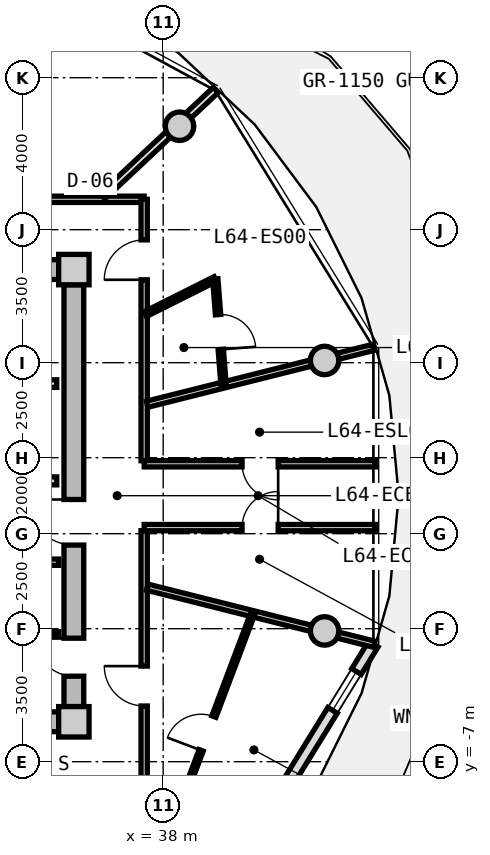
"""IFC4 building model, lengths in metres.
Left out: names, types, materials, properties, quantities, classifications, styles, units other than length and angle.
Written with IfcOpenShell. Run it as: python <this file> out.ifc"""

import sys

from ifc_helpers import new_model, si_unit, direction, frame, frame_2d, origin, origin_2d, place, context, subcontext, project, spatial, rectangle, circle, extrude, source, transform, mapped, element, fill, save


model = new_model("IFC4")
c1 = context("Model", 3, precision=1e-05, world=origin(), true_north=direction((0.0, 1.0)))
c2 = subcontext(c1, "Body", "Model", "MODEL_VIEW")
j1 = project(units=[si_unit("LENGTHUNIT", "METRE"), si_unit("PLANEANGLEUNIT", "RADIAN")], contexts=[c1])
p1 = place(None, origin())
s1 = spatial("IfcSite", under=j1, at=p1, CompositionType="ELEMENT")
p2 = place(p1, origin())
s2 = spatial("IfcBuilding", under=s1, at=p2, CompositionType="ELEMENT")
p3 = place(p2, frame((0.0, 0.0, 207.8)))
s3 = spatial("IfcBuildingStorey", under=s2, at=p3, CompositionType="ELEMENT", Elevation=207.8)
m1 = source(origin(), c2, "Body", "SweptSolid", [
    extrude(rectangle(XDim=0.8, YDim=0.8, at=origin_2d()), origin(), (0.0, 0.0, 1.0), 3.05),
])
for number, where, z_axis, x_axis in (
    (1, (35.65, -5.95, 0.0), (0.0, 0.0, 1.0), (1.0, 0.0, 0.0)),
    (2, (35.65, 5.95, 0.0), (0.0, 0.0, 1.0), (1.0, 0.0, 0.0)),
):
    element("IfcColumn", number, at=place(p3, frame(where, z_axis=z_axis, x_axis=x_axis)), inside=s3, PredefinedType="COLUMN", context=c2, shape_type="MappedRepresentation", body=[
        mapped(m1, transform((0.0, 0.0, 0.0), x_axis=(1.0, 0.0, 0.0), y_axis=(0.0, 1.0, 0.0), z_axis=(0.0, 0.0, 1.0), scale=1.0)),
    ])
m2 = source(origin(), c2, "Body", "SweptSolid", [
    extrude(rectangle(XDim=14.5, YDim=0.52, at=frame_2d((7.25, 0.0))), origin(), (0.0, 0.0, 1.0), 2.76),
])
for number, where, z_axis, x_axis in (
    (3, (20.75, 5.95, 0.0), (0.0, 0.0, 1.0), (1.0, 0.0, 0.0)),
    (4, (35.25, -5.95, 0.0), (0.0, 0.0, 1.0), (-1.0, 0.0, 0.0)),
):
    element("IfcWall", number, at=place(p3, frame(where, z_axis=z_axis, x_axis=x_axis)), inside=s3, PredefinedType="SHEAR", context=c2, shape_type="MappedRepresentation", body=[
        mapped(m2, transform((0.0, 0.0, 0.0), x_axis=(1.0, 0.0, 0.0), y_axis=(0.0, 1.0, 0.0), z_axis=(0.0, 0.0, 1.0), scale=1.0)),
    ])
m3 = source(origin(), c2, "Body", "SweptSolid", [
    extrude(rectangle(XDim=11.1, YDim=0.52, at=frame_2d((5.55, 0.0))), origin(), (0.0, 0.0, 1.0), 2.76),
])
p4 = place(p3, frame((35.65, 5.55, 0.0), z_axis=(0.0, 0.0, 1.0), x_axis=(0.0, -1.0, 0.0)))
e5 = element("IfcWall", 5, at=p4, inside=s3, PredefinedType="SHEAR", context=c2, shape_type="MappedRepresentation", body=[
    mapped(m3, transform((0.0, 0.0, 0.0), x_axis=(1.0, 0.0, 0.0), y_axis=(0.0, 1.0, 0.0), z_axis=(0.0, 0.0, 1.0), scale=1.0)),
])
p5 = place(p4, frame((5.65, 0.0, 0.0)))
e6 = element("IfcOpeningElement", 6, at=p5, cuts=e5, PredefinedType="OPENING", context=c2, shape_type="SweptSolid", body=[
    extrude(rectangle(XDim=1.2, YDim=2.15, at=frame_2d((0.6, 1.075))), frame((0.0, 0.27, 0.0), z_axis=(0.0, -1.0, 0.0), x_axis=(1.0, 0.0, 0.0)), (0.0, 0.0, 1.0), 0.54),
])
p6 = place(p4, frame((9.3, 0.0, 0.0)))
e7 = element("IfcOpeningElement", 7, at=p6, cuts=e5, PredefinedType="OPENING", context=c2, shape_type="SweptSolid", body=[
    extrude(rectangle(XDim=1.0, YDim=2.1, at=frame_2d((0.5, 1.05))), frame((0.0, 0.27, 0.0), z_axis=(0.0, -1.0, 0.0), x_axis=(1.0, 0.0, 0.0)), (0.0, 0.0, 1.0), 0.54),
])
m4 = source(origin(), c2, "Body", "SweptSolid", [
    extrude(circle(Radius=0.375, at=origin_2d()), origin(), (0.0, 0.0, 1.0), 3.05),
])
for number, where, z_axis, x_axis in (
    (8, (42.247, 3.559, 0.0), (0.0, 0.0, 1.0), (1.0, 0.0, 0.0)),
    (9, (38.43, 9.723, 0.0), (0.0, 0.0, 1.0), (1.0, 0.0, 0.0)),
    (10, (42.247, -3.559, 0.0), (0.0, 0.0, 1.0), (1.0, 0.0, 0.0)),
):
    element("IfcColumn", number, at=place(p3, frame(where, z_axis=z_axis, x_axis=x_axis)), inside=s3, PredefinedType="COLUMN", context=c2, shape_type="MappedRepresentation", body=[
        mapped(m4, transform((0.0, 0.0, 0.0), x_axis=(1.0, 0.0, 0.0), y_axis=(0.0, 1.0, 0.0), z_axis=(0.0, 0.0, 1.0), scale=1.0)),
    ])
m5 = source(origin(), c2, "Body", "SweptSolid", [
    extrude(rectangle(XDim=7.938, YDim=0.29, at=frame_2d((3.969, 0.0))), origin(), (0.0, 0.0, 1.0), 2.76),
])
p7 = place(p3, frame((43.532, -3.903, 0.0), z_axis=(0.0, 0.0, 1.0), x_axis=(-0.524244987663, -0.851567491694, 0.0)))
e11 = element("IfcWall", 11, at=p7, inside=s3, PredefinedType="SOLIDWALL", context=c2, shape_type="MappedRepresentation", body=[
    mapped(m5, transform((0.0, 0.0, 0.0), x_axis=(1.0, 0.0, 0.0), y_axis=(0.0, 1.0, 0.0), z_axis=(0.0, 0.0, 1.0), scale=1.0)),
])
p8 = place(p7, frame((5.94, 0.0, 0.0)))
e12 = element("IfcOpeningElement", 12, at=p8, cuts=e11, PredefinedType="OPENING", context=c2, shape_type="SweptSolid", body=[
    extrude(rectangle(XDim=1.15, YDim=2.25, at=frame_2d((0.575, 1.125))), frame((0.0, 0.155, 0.0), z_axis=(0.0, -1.0, 0.0), x_axis=(1.0, 0.0, 0.0)), (0.0, 0.0, 1.0), 0.31),
])
p9 = place(p7, frame((0.85, 0.0, 0.85)))
e13 = element("IfcOpeningElement", 13, at=p9, cuts=e11, PredefinedType="OPENING", context=c2, shape_type="SweptSolid", body=[
    extrude(rectangle(XDim=1.2, YDim=1.5, at=frame_2d((0.6, 0.75))), frame((0.0, 0.155, 0.0), z_axis=(0.0, -1.0, 0.0), x_axis=(1.0, 0.0, 0.0)), (0.0, 0.0, 1.0), 0.31),
])
m6 = source(origin(), c2, "Body", "SweptSolid", [
    extrude(rectangle(XDim=3.2, YDim=0.2, at=frame_2d((1.6, 0.0))), origin(), (0.0, 0.0, 1.0), 2.745),
])
p10 = place(p3, frame((32.0, 2.95, 0.0), z_axis=(0.0, 0.0, 1.0), x_axis=(1.0, 0.0, 0.0)))
e14 = element("IfcWall", 14, at=p10, inside=s3, PredefinedType="PARTITIONING", context=c2, shape_type="MappedRepresentation", body=[
    mapped(m6, transform((0.0, 0.0, 0.0), x_axis=(1.0, 0.0, 0.0), y_axis=(0.0, 1.0, 0.0), z_axis=(0.0, 0.0, 1.0), scale=1.0)),
])
m7 = source(origin(), c2, "Body", "SweptSolid", [
    extrude(rectangle(XDim=6.66, YDim=0.21, at=frame_2d((3.33, 0.0))), origin(), (0.0, 0.0, 1.0), 2.745),
])
p11 = place(p3, frame((28.54, 0.39, 0.0), z_axis=(0.0, 0.0, 1.0), x_axis=(1.0, 0.0, 0.0)))
e15 = element("IfcWall", 15, at=p11, inside=s3, PredefinedType="PARTITIONING", context=c2, shape_type="MappedRepresentation", body=[
    mapped(m7, transform((0.0, 0.0, 0.0), x_axis=(1.0, 0.0, 0.0), y_axis=(0.0, 1.0, 0.0), z_axis=(0.0, 0.0, 1.0), scale=1.0)),
])
p12 = place(p11, frame((1.0, 0.0, 0.0)))
e16 = element("IfcOpeningElement", 16, at=p12, cuts=e15, PredefinedType="OPENING", context=c2, shape_type="SweptSolid", body=[
    extrude(rectangle(XDim=1.2, YDim=2.15, at=frame_2d((0.6, 1.075))), frame((0.0, 0.115, 0.0), z_axis=(0.0, -1.0, 0.0), x_axis=(1.0, 0.0, 0.0)), (0.0, 0.0, 1.0), 0.23),
])
m8 = source(origin(), c2, "Body", "SweptSolid", [
    extrude(rectangle(XDim=2.7, YDim=0.165, at=frame_2d((1.35, 0.0))), origin(), (0.0, 0.0, 1.0), 2.745),
])
p13 = place(p3, frame((32.55, -1.75, 0.0), z_axis=(0.0, 0.0, 1.0), x_axis=(1.0, 0.0, 0.0)))
e17 = element("IfcWall", 17, at=p13, inside=s3, PredefinedType="PARTITIONING", context=c2, shape_type="MappedRepresentation", body=[
    mapped(m8, transform((0.0, 0.0, 0.0), x_axis=(1.0, 0.0, 0.0), y_axis=(0.0, 1.0, 0.0), z_axis=(0.0, 0.0, 1.0), scale=1.0)),
])
p14 = place(p13, frame((0.85, 0.0, 0.0)))
e18 = element("IfcOpeningElement", 18, at=p14, cuts=e17, PredefinedType="OPENING", context=c2, shape_type="SweptSolid", body=[
    extrude(rectangle(XDim=0.925, YDim=2.1, at=frame_2d((0.462, 1.05))), frame((0.0, 0.093, 0.0), z_axis=(0.0, -1.0, 0.0), x_axis=(1.0, 0.0, 0.0)), (0.0, 0.0, 1.0), 0.185),
])
m9 = source(origin(), c2, "Body", "SweptSolid", [
    extrude(rectangle(XDim=2.7, YDim=0.14, at=frame_2d((1.35, 0.0))), origin(), (0.0, 0.0, 1.0), 2.745),
])
p15 = place(p3, frame((32.55, -3.65, 0.0), z_axis=(0.0, 0.0, 1.0), x_axis=(1.0, 0.0, 0.0)))
e19 = element("IfcWall", 19, at=p15, inside=s3, PredefinedType="PARTITIONING", context=c2, shape_type="MappedRepresentation", body=[
    mapped(m9, transform((0.0, 0.0, 0.0), x_axis=(1.0, 0.0, 0.0), y_axis=(0.0, 1.0, 0.0), z_axis=(0.0, 0.0, 1.0), scale=1.0)),
])
m10 = source(origin(), c2, "Body", "SweptSolid", [
    extrude(rectangle(XDim=8.58, YDim=0.165, at=frame_2d((4.29, 0.0))), origin(), (0.0, 0.0, 1.0), 2.745),
])
p16 = place(p3, frame((28.92, 7.8, 0.0), z_axis=(0.0, 0.0, 1.0), x_axis=(1.0, 0.0, 0.0)))
e20 = element("IfcWall", 20, at=p16, inside=s3, PredefinedType="PARTITIONING", context=c2, shape_type="MappedRepresentation", body=[
    mapped(m10, transform((0.0, 0.0, 0.0), x_axis=(1.0, 0.0, 0.0), y_axis=(0.0, 1.0, 0.0), z_axis=(0.0, 0.0, 1.0), scale=1.0)),
])
p17 = place(p16, frame((3.802, 0.0, 0.0)))
e21 = element("IfcOpeningElement", 21, at=p17, cuts=e20, PredefinedType="OPENING", context=c2, shape_type="SweptSolid", body=[
    extrude(rectangle(XDim=1.25, YDim=2.2, at=frame_2d((0.625, 1.1))), frame((0.0, 0.093, 0.0), z_axis=(0.0, -1.0, 0.0), x_axis=(1.0, 0.0, 0.0)), (0.0, 0.0, 1.0), 0.185),
])
m11 = source(origin(), c2, "Body", "SweptSolid", [
    extrude(rectangle(XDim=6.88, YDim=0.165, at=frame_2d((3.44, 0.0))), origin(), (0.0, 0.0, 1.0), 2.745),
])
p18 = place(p3, frame((37.5, 7.8, 0.0), z_axis=(0.0, 0.0, 1.0), x_axis=(0.0, -1.0, 0.0)))
e22 = element("IfcWall", 22, at=p18, inside=s3, PredefinedType="PARTITIONING", context=c2, shape_type="MappedRepresentation", body=[
    mapped(m11, transform((0.0, 0.0, 0.0), x_axis=(1.0, 0.0, 0.0), y_axis=(0.0, 1.0, 0.0), z_axis=(0.0, 0.0, 1.0), scale=1.0)),
])
p19 = place(p18, frame((1.068, 0.0, 0.0)))
e23 = element("IfcOpeningElement", 23, at=p19, cuts=e22, PredefinedType="OPENING", context=c2, shape_type="SweptSolid", body=[
    extrude(rectangle(XDim=1.05, YDim=2.15, at=frame_2d((0.525, 1.075))), frame((0.0, 0.093, 0.0), z_axis=(0.0, -1.0, 0.0), x_axis=(1.0, 0.0, 0.0)), (0.0, 0.0, 1.0), 0.185),
])
p20 = place(p3, frame((37.5, -0.92, 0.0), z_axis=(0.0, 0.0, 1.0), x_axis=(0.0, -1.0, 0.0)))
e24 = element("IfcWall", 24, at=p20, inside=s3, PredefinedType="PARTITIONING", context=c2, shape_type="MappedRepresentation", body=[
    mapped(m11, transform((0.0, 0.0, 0.0), x_axis=(1.0, 0.0, 0.0), y_axis=(0.0, 1.0, 0.0), z_axis=(0.0, 0.0, 1.0), scale=1.0)),
])
p21 = place(p20, frame((3.564, 0.0, 0.0)))
e25 = element("IfcOpeningElement", 25, at=p21, cuts=e24, PredefinedType="OPENING", context=c2, shape_type="SweptSolid", body=[
    extrude(rectangle(XDim=1.05, YDim=2.15, at=frame_2d((0.525, 1.075))), frame((0.0, 0.093, 0.0), z_axis=(0.0, -1.0, 0.0), x_axis=(1.0, 0.0, 0.0)), (0.0, 0.0, 1.0), 0.185),
])
m12 = source(origin(), c2, "Body", "SweptSolid", [
    extrude(rectangle(XDim=6.157, YDim=0.165, at=frame_2d((3.079, 0.0))), origin(), (0.0, 0.0, 1.0), 2.385),
])
p22 = place(p3, frame((37.58, -2.407, 0.0), z_axis=(0.0, 0.0, 1.0), x_axis=(0.969840867184, -0.243738984038, 0.0)))
e26 = element("IfcWall", 26, at=p22, inside=s3, PredefinedType="PARTITIONING", context=c2, shape_type="MappedRepresentation", body=[
    mapped(m12, transform((0.0, 0.0, 0.0), x_axis=(1.0, 0.0, 0.0), y_axis=(0.0, 1.0, 0.0), z_axis=(0.0, 0.0, 1.0), scale=1.0)),
])
m13 = source(origin(), c2, "Body", "SweptSolid", [
    extrude(rectangle(XDim=6.157, YDim=0.165, at=frame_2d((3.079, 0.0))), origin(), (0.0, 0.0, 1.0), 2.345),
])
p23 = place(p3, frame((37.58, 2.407, 0.0), z_axis=(0.0, 0.0, 1.0), x_axis=(0.969840867184, 0.243738984038, 0.0)))
e27 = element("IfcWall", 27, at=p23, inside=s3, PredefinedType="PARTITIONING", context=c2, shape_type="MappedRepresentation", body=[
    mapped(m13, transform((0.0, 0.0, 0.0), x_axis=(1.0, 0.0, 0.0), y_axis=(0.0, 1.0, 0.0), z_axis=(0.0, 0.0, 1.0), scale=1.0)),
])
m14 = source(origin(), c2, "Body", "SweptSolid", [
    extrude(rectangle(XDim=6.101, YDim=0.165, at=frame_2d((3.051, 0.0))), origin(), (0.0, 0.0, 1.0), 2.745),
])
p24 = place(p3, frame((37.5, 0.84, 0.0), z_axis=(0.0, 0.0, 1.0), x_axis=(1.0, 0.0, 0.0)))
e28 = element("IfcWall", 28, at=p24, inside=s3, PredefinedType="PARTITIONING", context=c2, shape_type="MappedRepresentation", body=[
    mapped(m14, transform((0.0, 0.0, 0.0), x_axis=(1.0, 0.0, 0.0), y_axis=(0.0, 1.0, 0.0), z_axis=(0.0, 0.0, 1.0), scale=1.0)),
])
p25 = place(p24, frame((2.576, 0.0, 0.0)))
e29 = element("IfcOpeningElement", 29, at=p25, cuts=e28, PredefinedType="OPENING", context=c2, shape_type="SweptSolid", body=[
    extrude(rectangle(XDim=0.95, YDim=2.1, at=frame_2d((0.475, 1.05))), frame((0.0, 0.093, 0.0), z_axis=(0.0, -1.0, 0.0), x_axis=(1.0, 0.0, 0.0)), (0.0, 0.0, 1.0), 0.185),
])
p26 = place(p3, frame((43.601, -0.84, 0.0), z_axis=(0.0, 0.0, 1.0), x_axis=(-1.0, 0.0, 0.0)))
e30 = element("IfcWall", 30, at=p26, inside=s3, PredefinedType="PARTITIONING", context=c2, shape_type="MappedRepresentation", body=[
    mapped(m14, transform((0.0, 0.0, 0.0), x_axis=(1.0, 0.0, 0.0), y_axis=(0.0, 1.0, 0.0), z_axis=(0.0, 0.0, 1.0), scale=1.0)),
])
p27 = place(p26, frame((2.576, 0.0, 0.0)))
e31 = element("IfcOpeningElement", 31, at=p27, cuts=e30, PredefinedType="OPENING", context=c2, shape_type="SweptSolid", body=[
    extrude(rectangle(XDim=0.95, YDim=2.1, at=frame_2d((0.475, 1.05))), frame((0.0, 0.093, 0.0), z_axis=(0.0, -1.0, 0.0), x_axis=(1.0, 0.0, 0.0)), (0.0, 0.0, 1.0), 0.185),
])
m15 = source(origin(), c2, "Body", "SweptSolid", [
    extrude(rectangle(XDim=4.089, YDim=0.19, at=frame_2d((2.044, 0.0))), origin(), (0.0, 0.0, 1.0), 2.345),
])
p28 = place(p3, frame((36.402, 7.88, 0.0), z_axis=(0.0, 0.0, 1.0), x_axis=(0.729401273609, 0.684086092577, 0.0)))
e32 = element("IfcWall", 32, at=p28, inside=s3, PredefinedType="PARTITIONING", context=c2, shape_type="MappedRepresentation", body=[
    mapped(m15, transform((0.0, 0.0, 0.0), x_axis=(1.0, 0.0, 0.0), y_axis=(0.0, 1.0, 0.0), z_axis=(0.0, 0.0, 1.0), scale=1.0)),
])
m16 = source(origin(), c2, "Body", "SweptSolid", [
    extrude(rectangle(XDim=2.06, YDim=0.14, at=frame_2d((1.03, 0.0))), origin(), (0.0, 0.0, 1.0), 2.745),
])
p29 = place(p3, frame((37.53, 4.778, 0.0), z_axis=(0.0, 0.0, 1.0), x_axis=(0.893952568722, 0.448161583444, 0.0)))
e33 = element("IfcWall", 33, at=p29, inside=s3, PredefinedType="PARTITIONING", context=c2, shape_type="MappedRepresentation", body=[
    mapped(m16, transform((0.0, 0.0, 0.0), x_axis=(1.0, 0.0, 0.0), y_axis=(0.0, 1.0, 0.0), z_axis=(0.0, 0.0, 1.0), scale=1.0)),
])
m17 = source(origin(), c2, "Body", "SweptSolid", [
    extrude(rectangle(XDim=2.798, YDim=0.14, at=frame_2d((1.399, 0.0))), origin(), (0.0, 0.0, 1.0), 2.745),
])
p30 = place(p3, frame((39.371, 5.701, 0.0), z_axis=(0.0, 0.0, 1.0), x_axis=(0.077823984089, -0.996967114553, 0.0)))
e34 = element("IfcWall", 34, at=p30, inside=s3, PredefinedType="PARTITIONING", context=c2, shape_type="MappedRepresentation", body=[
    mapped(m17, transform((0.0, 0.0, 0.0), x_axis=(1.0, 0.0, 0.0), y_axis=(0.0, 1.0, 0.0), z_axis=(0.0, 0.0, 1.0), scale=1.0)),
])
p31 = place(p30, frame((0.939, 0.0, 0.0)))
e35 = element("IfcOpeningElement", 35, at=p31, cuts=e34, PredefinedType="OPENING", context=c2, shape_type="SweptSolid", body=[
    extrude(rectangle(XDim=0.92, YDim=2.1, at=frame_2d((0.46, 1.05))), frame((0.0, 0.08, 0.0), z_axis=(0.0, -1.0, 0.0), x_axis=(1.0, 0.0, 0.0)), (0.0, 0.0, 1.0), 0.16),
])
m18 = source(origin(), c2, "Body", "SweptSolid", [
    extrude(rectangle(XDim=6.738, YDim=0.115, at=frame_2d((3.369, 0.0))), origin(), (0.0, 0.0, 1.0), 2.745),
])
p32 = place(p3, frame((37.978, -9.409, 0.0), z_axis=(0.0, 0.0, 1.0), x_axis=(0.352945344347, 0.935643940772, 0.0)))
e36 = element("IfcWall", 36, at=p32, inside=s3, PredefinedType="PARTITIONING", context=c2, shape_type="MappedRepresentation", body=[
    mapped(m18, transform((0.0, 0.0, 0.0), x_axis=(1.0, 0.0, 0.0), y_axis=(0.0, 1.0, 0.0), z_axis=(0.0, 0.0, 1.0), scale=1.0)),
])
p33 = place(p32, frame((2.894, 0.0, 0.0)))
e37 = element("IfcOpeningElement", 37, at=p33, cuts=e36, PredefinedType="OPENING", context=c2, shape_type="SweptSolid", body=[
    extrude(rectangle(XDim=0.95, YDim=2.1, at=frame_2d((0.475, 1.05))), frame((0.0, 0.067, 0.0), z_axis=(0.0, -1.0, 0.0), x_axis=(1.0, 0.0, 0.0)), (0.0, 0.0, 1.0), 0.135),
])
m19 = source(origin(), c2, "Body", "SweptSolid", [
    extrude(rectangle(XDim=1.2, YDim=1.5, at=frame_2d((0.6, 0.75))), frame((0.0, 0.03, 0.0), z_axis=(0.0, -1.0, 0.0), x_axis=(1.0, 0.0, 0.0)), (0.0, 0.0, 1.0), 0.06),
])
p34 = place(p9, origin())
e38 = element("IfcWindow", 38, at=p34, inside=s3, PartitioningType="SINGLE_PANEL", PredefinedType="WINDOW", context=c2, shape_type="MappedRepresentation", body=[
    mapped(m19, transform((0.0, 0.0, 0.0), x_axis=(1.0, 0.0, 0.0), y_axis=(0.0, 1.0, 0.0), z_axis=(0.0, 0.0, 1.0), scale=1.0)),
])
fill(e13, e38)
m20 = source(origin(), c2, "Body", "SweptSolid", [
    extrude(rectangle(XDim=1.2, YDim=2.15, at=frame_2d((0.6, 1.075))), frame((0.0, 0.025, 0.0), z_axis=(0.0, -1.0, 0.0), x_axis=(1.0, 0.0, 0.0)), (0.0, 0.0, 1.0), 0.05),
])
p35 = place(p5, frame((1.2, 0.0, 0.0), z_axis=(0.0, 0.0, 1.0), x_axis=(-1.0, 0.0, 0.0)))
e39 = element("IfcDoor", 39, at=p35, inside=s3, OperationType="SINGLE_SWING_RIGHT", PredefinedType="DOOR", context=c2, shape_type="MappedRepresentation", body=[
    mapped(m20, transform((0.0, 0.0, 0.0), x_axis=(1.0, 0.0, 0.0), y_axis=(0.0, 1.0, 0.0), z_axis=(0.0, 0.0, 1.0), scale=1.0)),
])
fill(e6, e39)
m21 = source(origin(), c2, "Body", "SweptSolid", [
    extrude(rectangle(XDim=1.0, YDim=2.1, at=frame_2d((0.5, 1.05))), frame((0.0, 0.025, 0.0), z_axis=(0.0, -1.0, 0.0), x_axis=(1.0, 0.0, 0.0)), (0.0, 0.0, 1.0), 0.05),
])
p36 = place(p6, frame((1.0, 0.0, 0.0), z_axis=(0.0, 0.0, 1.0), x_axis=(-1.0, 0.0, 0.0)))
e40 = element("IfcDoor", 40, at=p36, inside=s3, OperationType="SINGLE_SWING_RIGHT", PredefinedType="DOOR", context=c2, shape_type="MappedRepresentation", body=[
    mapped(m21, transform((0.0, 0.0, 0.0), x_axis=(1.0, 0.0, 0.0), y_axis=(0.0, 1.0, 0.0), z_axis=(0.0, 0.0, 1.0), scale=1.0)),
])
fill(e7, e40)
m22 = source(origin(), c2, "Body", "SweptSolid", [
    extrude(rectangle(XDim=0.95, YDim=2.1, at=frame_2d((0.475, 1.05))), frame((0.0, 0.025, 0.0), z_axis=(0.0, -1.0, 0.0), x_axis=(1.0, 0.0, 0.0)), (0.0, 0.0, 1.0), 0.05),
])
p37 = place(p27, frame((0.95, 0.0, 0.0), z_axis=(0.0, 0.0, 1.0), x_axis=(-1.0, 0.0, 0.0)))
e41 = element("IfcDoor", 41, at=p37, inside=s3, OperationType="SINGLE_SWING_RIGHT", PredefinedType="DOOR", context=c2, shape_type="MappedRepresentation", body=[
    mapped(m22, transform((0.0, 0.0, 0.0), x_axis=(1.0, 0.0, 0.0), y_axis=(0.0, 1.0, 0.0), z_axis=(0.0, 0.0, 1.0), scale=1.0)),
])
fill(e31, e41)
p38 = place(p25, frame((0.95, 0.0, 0.0), z_axis=(0.0, 0.0, 1.0), x_axis=(-1.0, 0.0, 0.0)))
e42 = element("IfcDoor", 42, at=p38, inside=s3, OperationType="SINGLE_SWING_LEFT", PredefinedType="DOOR", context=c2, shape_type="MappedRepresentation", body=[
    mapped(m22, transform((0.0, 0.0, 0.0), x_axis=(1.0, 0.0, 0.0), y_axis=(0.0, 1.0, 0.0), z_axis=(0.0, 0.0, 1.0), scale=1.0)),
])
fill(e29, e42)
m23 = source(origin(), c2, "Body", "SweptSolid", [
    extrude(rectangle(XDim=1.05, YDim=2.15, at=frame_2d((0.525, 1.075))), frame((0.0, 0.025, 0.0), z_axis=(0.0, -1.0, 0.0), x_axis=(1.0, 0.0, 0.0)), (0.0, 0.0, 1.0), 0.05),
])
p39 = place(p19, frame((1.05, 0.0, 0.0), z_axis=(0.0, 0.0, 1.0), x_axis=(-1.0, 0.0, 0.0)))
e43 = element("IfcDoor", 43, at=p39, inside=s3, OperationType="SINGLE_SWING_LEFT", PredefinedType="DOOR", context=c2, shape_type="MappedRepresentation", body=[
    mapped(m23, transform((0.0, 0.0, 0.0), x_axis=(1.0, 0.0, 0.0), y_axis=(0.0, 1.0, 0.0), z_axis=(0.0, 0.0, 1.0), scale=1.0)),
])
fill(e23, e43)
m24 = source(origin(), c2, "Body", "SweptSolid", [
    extrude(rectangle(XDim=0.92, YDim=2.1, at=frame_2d((0.46, 1.05))), frame((0.0, 0.025, 0.0), z_axis=(0.0, -1.0, 0.0), x_axis=(1.0, 0.0, 0.0)), (0.0, 0.0, 1.0), 0.05),
])
p40 = place(p31, origin())
e44 = element("IfcDoor", 44, at=p40, inside=s3, OperationType="SINGLE_SWING_RIGHT", PredefinedType="DOOR", context=c2, shape_type="MappedRepresentation", body=[
    mapped(m24, transform((0.0, 0.0, 0.0), x_axis=(1.0, 0.0, 0.0), y_axis=(0.0, 1.0, 0.0), z_axis=(0.0, 0.0, 1.0), scale=1.0)),
])
fill(e35, e44)
p41 = place(p21, frame((1.05, 0.0, 0.0), z_axis=(0.0, 0.0, 1.0), x_axis=(-1.0, 0.0, 0.0)))
e45 = element("IfcDoor", 45, at=p41, inside=s3, OperationType="SINGLE_SWING_RIGHT", PredefinedType="DOOR", context=c2, shape_type="MappedRepresentation", body=[
    mapped(m23, transform((0.0, 0.0, 0.0), x_axis=(1.0, 0.0, 0.0), y_axis=(0.0, 1.0, 0.0), z_axis=(0.0, 0.0, 1.0), scale=1.0)),
])
fill(e25, e45)
p42 = place(p33, origin())
e46 = element("IfcDoor", 46, at=p42, inside=s3, OperationType="SINGLE_SWING_LEFT", PredefinedType="DOOR", context=c2, shape_type="MappedRepresentation", body=[
    mapped(m22, transform((0.0, 0.0, 0.0), x_axis=(1.0, 0.0, 0.0), y_axis=(0.0, 1.0, 0.0), z_axis=(0.0, 0.0, 1.0), scale=1.0)),
])
fill(e37, e46)
save(model, sys.argv[1])
